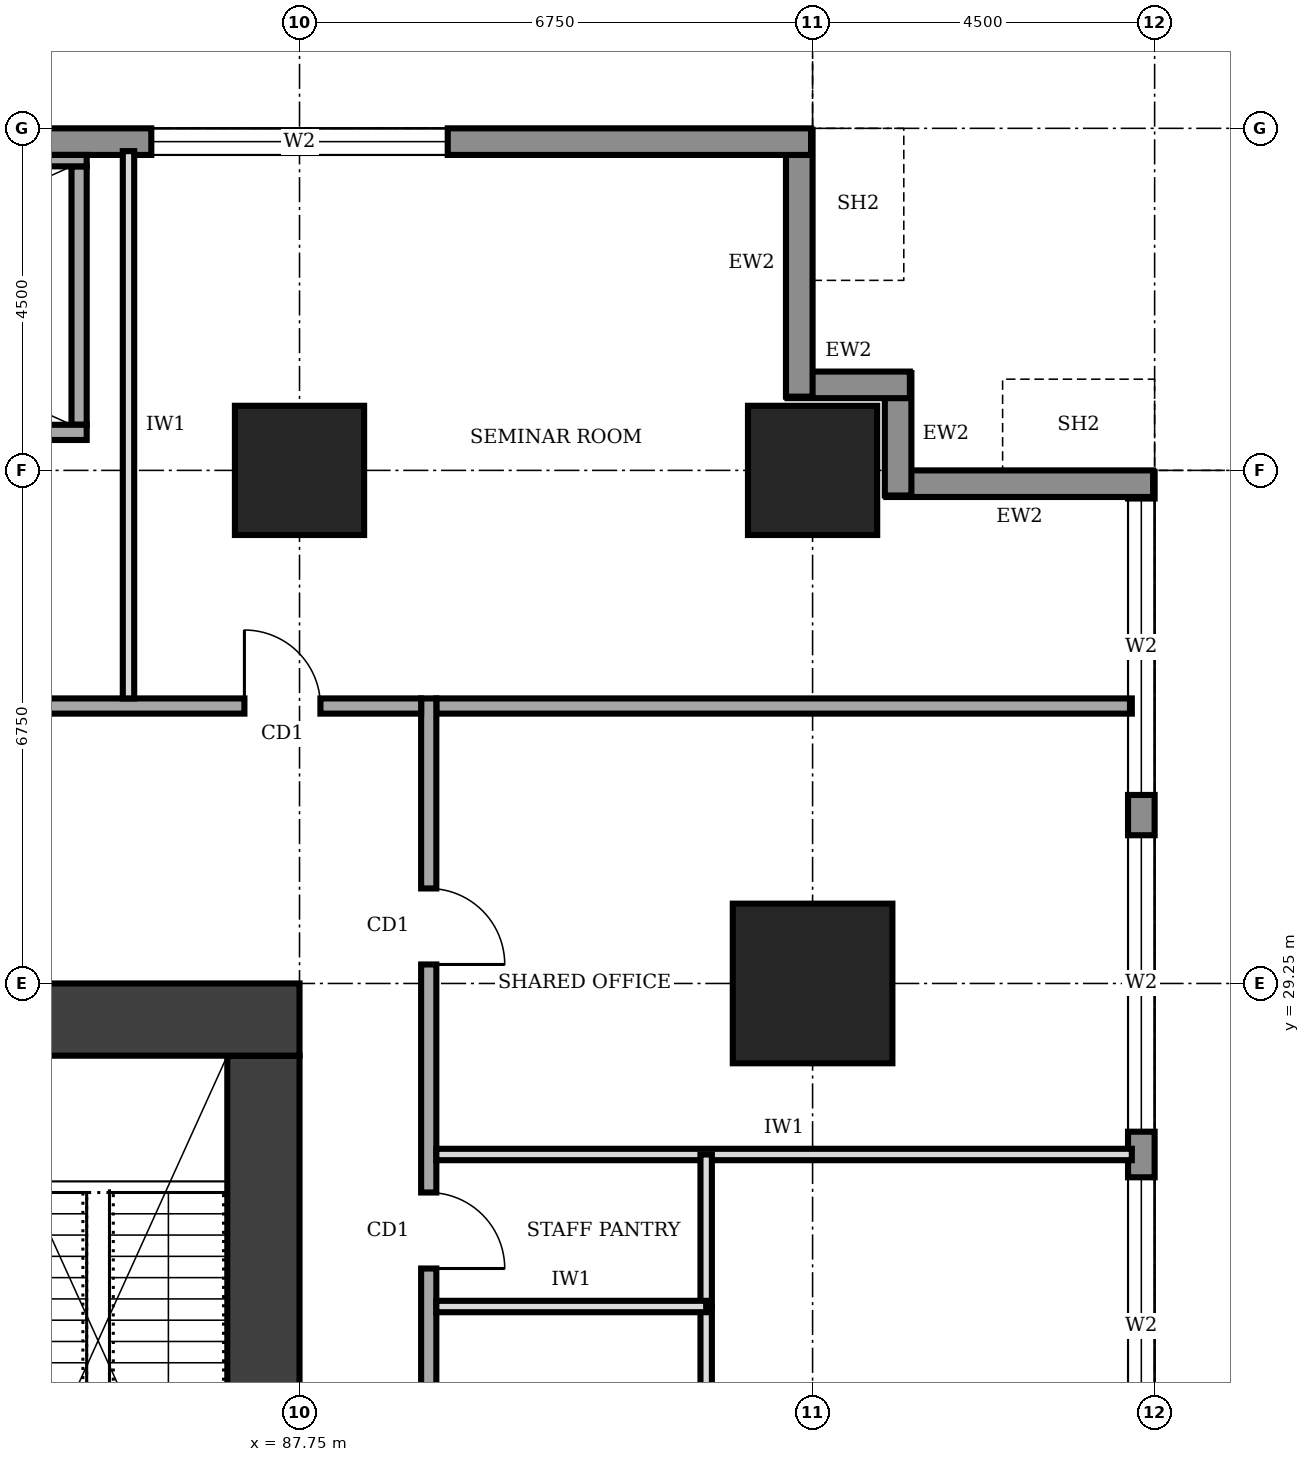
"""IFC4 building model, lengths in metres.
Left out: names, types, materials, properties, quantities, classifications, styles, units other than length and angle.
Written with IfcOpenShell. Run it as: python <this file> out.ifc"""

import sys

from ifc_helpers import new_model, si_unit, direction, frame, frame_2d, origin, origin_2d, place, context, subcontext, project, spatial, rectangle, extrude, element, fill, save


model = new_model("IFC4")
c1 = context("Model", 3, precision=1e-05, world=origin(), true_north=direction((0.0, 1.0)))
c2 = subcontext(c1, "Body", "Model", "MODEL_VIEW")
j1 = project(units=[si_unit("LENGTHUNIT", "METRE"), si_unit("PLANEANGLEUNIT", "RADIAN")], contexts=[c1])
p1 = place(None, origin())
s1 = spatial("IfcSite", under=j1, at=p1, CompositionType="ELEMENT")
p2 = place(p1, origin())
s2 = spatial("IfcBuilding", under=s1, at=p2, CompositionType="ELEMENT")
p3 = place(p2, frame((0.0, 0.0, 61.0)))
s3 = spatial("IfcBuildingStorey", under=s2, at=p3, CompositionType="ELEMENT", Elevation=61.0)
p4 = place(p3, frame((87.275, 12.2, 0.0), z_axis=(0.0, 0.0, 1.0), x_axis=(0.0, 1.0, 0.0)))
e1 = element("IfcWall", 1, at=p4, inside=s3, PredefinedType="SHEAR", context=c2, shape_type="SweptSolid", body=[
    extrude(rectangle(XDim=16.1, YDim=0.95, at=frame_2d((8.05, 0.0))), origin(), (0.0, 0.0, 1.0), 4.0),
])
p5 = place(p3, frame((87.75, 28.775, 0.0), z_axis=(0.0, 0.0, 1.0), x_axis=(-1.0, 0.0, 0.0)))
e2 = element("IfcWall", 2, at=p5, inside=s3, PredefinedType="SHEAR", context=c2, shape_type="SweptSolid", body=[
    extrude(rectangle(XDim=13.5, YDim=0.95, at=frame_2d((6.75, 0.0))), origin(), (0.0, 0.0, 1.0), 4.0),
])
p6 = place(p5, frame((4.75, 0.0, 0.0)))
e3 = element("IfcOpeningElement", 3, at=p6, cuts=e2, PredefinedType="OPENING", context=c2, shape_type="SweptSolid", body=[
    extrude(rectangle(XDim=1.8, YDim=2.1, at=frame_2d((0.9, 1.05))), frame((0.0, 0.485, 0.0), z_axis=(0.0, -1.0, 0.0), x_axis=(1.0, 0.0, 0.0)), (0.0, 0.0, 1.0), 0.97),
])
p7 = place(p3, frame((94.5, 29.25, 0.0), z_axis=(0.0, 0.0, 1.0), x_axis=(1.0, 0.0, 0.0)))
e4 = element("IfcColumn", 4, at=p7, inside=s3, PredefinedType="COLUMN", context=c2, shape_type="SweptSolid", body=[
    extrude(rectangle(XDim=2.1, YDim=2.1, at=origin_2d()), origin(), (0.0, 0.0, 1.0), 4.0),
])
for number, where, z_axis, x_axis in (
    (5, (87.75, 36.0, 0.0), (0.0, 0.0, 1.0), (1.0, 0.0, 0.0)),
    (6, (94.5, 36.0, 0.0), (0.0, 0.0, 1.0), (1.0, 0.0, 0.0)),
):
    element("IfcColumn", number, at=place(p3, frame(where, z_axis=z_axis, x_axis=x_axis)), inside=s3, PredefinedType="COLUMN", context=c2, shape_type="SweptSolid", body=[
        extrude(rectangle(XDim=1.7, YDim=1.7, at=origin_2d()), origin(), (0.0, 0.0, 1.0), 4.0),
    ])
p8 = place(p3, frame((98.825, 4.52, 0.0), z_axis=(0.0, 0.0, 1.0), x_axis=(0.0, 1.0, 0.0)))
e7 = element("IfcWall", 7, at=p8, inside=s3, PredefinedType="STANDARD", context=c2, shape_type="SweptSolid", body=[
    extrude(rectangle(XDim=31.46, YDim=0.35, at=frame_2d((15.73, 0.0))), origin(), (0.0, 0.0, 1.0), 3.75),
])
p9 = place(p8, frame((4.78, 0.0, 0.6)))
e8 = element("IfcOpeningElement", 8, at=p9, cuts=e7, PredefinedType="OPENING", context=c2, shape_type="SweptSolid", body=[
    extrude(rectangle(XDim=3.9, YDim=2.6, at=frame_2d((1.95, 1.3))), frame((0.0, 0.185, 0.0), z_axis=(0.0, -1.0, 0.0), x_axis=(1.0, 0.0, 0.0)), (0.0, 0.0, 1.0), 0.37),
])
p10 = place(p8, frame((9.28, 0.0, 0.6)))
e9 = element("IfcOpeningElement", 9, at=p10, cuts=e7, PredefinedType="OPENING", context=c2, shape_type="SweptSolid", body=[
    extrude(rectangle(XDim=3.9, YDim=2.6, at=frame_2d((1.95, 1.3))), frame((0.0, 0.185, 0.0), z_axis=(0.0, -1.0, 0.0), x_axis=(1.0, 0.0, 0.0)), (0.0, 0.0, 1.0), 0.37),
])
p11 = place(p8, frame((13.78, 0.0, 0.6)))
e10 = element("IfcOpeningElement", 10, at=p11, cuts=e7, PredefinedType="OPENING", context=c2, shape_type="SweptSolid", body=[
    extrude(rectangle(XDim=3.9, YDim=2.6, at=frame_2d((1.95, 1.3))), frame((0.0, 0.185, 0.0), z_axis=(0.0, -1.0, 0.0), x_axis=(1.0, 0.0, 0.0)), (0.0, 0.0, 1.0), 0.37),
])
p12 = place(p8, frame((18.28, 0.0, 0.6)))
e11 = element("IfcOpeningElement", 11, at=p12, cuts=e7, PredefinedType="OPENING", context=c2, shape_type="SweptSolid", body=[
    extrude(rectangle(XDim=3.9, YDim=2.6, at=frame_2d((1.95, 1.3))), frame((0.0, 0.185, 0.0), z_axis=(0.0, -1.0, 0.0), x_axis=(1.0, 0.0, 0.0)), (0.0, 0.0, 1.0), 0.37),
])
p13 = place(p8, frame((22.78, 0.0, 0.6)))
e12 = element("IfcOpeningElement", 12, at=p13, cuts=e7, PredefinedType="OPENING", context=c2, shape_type="SweptSolid", body=[
    extrude(rectangle(XDim=3.9, YDim=2.6, at=frame_2d((1.95, 1.3))), frame((0.0, 0.185, 0.0), z_axis=(0.0, -1.0, 0.0), x_axis=(1.0, 0.0, 0.0)), (0.0, 0.0, 1.0), 0.37),
])
p14 = place(p8, frame((27.21, 0.0, 0.6)))
e13 = element("IfcOpeningElement", 13, at=p14, cuts=e7, PredefinedType="OPENING", context=c2, shape_type="SweptSolid", body=[
    extrude(rectangle(XDim=3.9, YDim=2.6, at=frame_2d((1.95, 1.3))), frame((0.0, 0.185, 0.0), z_axis=(0.0, -1.0, 0.0), x_axis=(1.0, 0.0, 0.0)), (0.0, 0.0, 1.0), 0.37),
])
p15 = place(p3, frame((98.98, 35.825, 0.0), z_axis=(0.0, 0.0, 1.0), x_axis=(-1.0, 0.0, 0.0)))
e14 = element("IfcWall", 14, at=p15, inside=s3, PredefinedType="STANDARD", context=c2, shape_type="SweptSolid", body=[
    extrude(rectangle(XDim=3.51, YDim=0.35, at=frame_2d((1.755, 0.0))), origin(), (0.0, 0.0, 1.0), 2.85),
])
for number, where, z_axis, x_axis in (
    (15, (95.625, 35.67, 0.0), (0.0, 0.0, 1.0), (0.0, 1.0, 0.0)),
    (16, (95.78, 37.125, 0.0), (0.0, 0.0, 1.0), (-1.0, 0.0, 0.0)),
):
    element("IfcWall", number, at=place(p3, frame(where, z_axis=z_axis, x_axis=x_axis)), inside=s3, PredefinedType="STANDARD", context=c2, shape_type="SweptSolid", body=[
        extrude(rectangle(XDim=1.61, YDim=0.35, at=frame_2d((0.805, 0.0))), origin(), (0.0, 0.0, 1.0), 3.75),
    ])
p16 = place(p3, frame((94.325, 36.97, 0.0), z_axis=(0.0, 0.0, 1.0), x_axis=(0.0, 1.0, 0.0)))
e17 = element("IfcWall", 17, at=p16, inside=s3, PredefinedType="STANDARD", context=c2, shape_type="SweptSolid", body=[
    extrude(rectangle(XDim=3.51, YDim=0.35, at=frame_2d((1.755, 0.0))), origin(), (0.0, 0.0, 1.0), 2.85),
])
p17 = place(p3, frame((94.48, 40.325, 0.0), z_axis=(0.0, 0.0, 1.0), x_axis=(-1.0, 0.0, 0.0)))
e18 = element("IfcWall", 18, at=p17, inside=s3, PredefinedType="STANDARD", context=c2, shape_type="SweptSolid", body=[
    extrude(rectangle(XDim=26.96, YDim=0.35, at=frame_2d((13.48, 0.0))), origin(), (0.0, 0.0, 1.0), 3.75),
])
p18 = place(p17, frame((22.71, 0.0, 0.6)))
e19 = element("IfcOpeningElement", 19, at=p18, cuts=e18, PredefinedType="OPENING", context=c2, shape_type="SweptSolid", body=[
    extrude(rectangle(XDim=3.9, YDim=2.6, at=frame_2d((1.95, 1.3))), frame((0.0, 0.185, 0.0), z_axis=(0.0, -1.0, 0.0), x_axis=(1.0, 0.0, 0.0)), (0.0, 0.0, 1.0), 0.37),
])
p19 = place(p17, frame((18.28, 0.0, 0.6)))
e20 = element("IfcOpeningElement", 20, at=p19, cuts=e18, PredefinedType="OPENING", context=c2, shape_type="SweptSolid", body=[
    extrude(rectangle(XDim=3.9, YDim=2.6, at=frame_2d((1.95, 1.3))), frame((0.0, 0.185, 0.0), z_axis=(0.0, -1.0, 0.0), x_axis=(1.0, 0.0, 0.0)), (0.0, 0.0, 1.0), 0.37),
])
p20 = place(p17, frame((4.78, 0.0, 0.6)))
e21 = element("IfcOpeningElement", 21, at=p20, cuts=e18, PredefinedType="OPENING", context=c2, shape_type="SweptSolid", body=[
    extrude(rectangle(XDim=3.9, YDim=2.6, at=frame_2d((1.95, 1.3))), frame((0.0, 0.185, 0.0), z_axis=(0.0, -1.0, 0.0), x_axis=(1.0, 0.0, 0.0)), (0.0, 0.0, 1.0), 0.37),
])
p21 = place(p3, frame((89.45, 7.7, 0.0), z_axis=(0.0, 0.0, 1.0), x_axis=(0.0, 1.0, 0.0)))
e22 = element("IfcWall", 22, at=p21, inside=s3, PredefinedType="SOLIDWALL", context=c2, shape_type="SweptSolid", body=[
    extrude(rectangle(XDim=25.3, YDim=0.2, at=frame_2d((12.65, 0.0))), origin(), (0.0, 0.0, 1.0), 3.75),
])
p22 = place(p21, frame((2.3, 0.0, 0.0)))
e23 = element("IfcOpeningElement", 23, at=p22, cuts=e22, PredefinedType="OPENING", context=c2, shape_type="SweptSolid", body=[
    extrude(rectangle(XDim=1.0, YDim=2.1, at=frame_2d((0.5, 1.05))), frame((0.0, 0.11, 0.0), z_axis=(0.0, -1.0, 0.0), x_axis=(1.0, 0.0, 0.0)), (0.0, 0.0, 1.0), 0.22),
])
p23 = place(p21, frame((7.25, 0.0, 0.0)))
e24 = element("IfcOpeningElement", 24, at=p23, cuts=e22, PredefinedType="OPENING", context=c2, shape_type="SweptSolid", body=[
    extrude(rectangle(XDim=0.9, YDim=2.1, at=frame_2d((0.45, 1.05))), frame((0.0, 0.11, 0.0), z_axis=(0.0, -1.0, 0.0), x_axis=(1.0, 0.0, 0.0)), (0.0, 0.0, 1.0), 0.22),
])
p24 = place(p21, frame((10.25, 0.0, 0.0)))
e25 = element("IfcOpeningElement", 25, at=p24, cuts=e22, PredefinedType="OPENING", context=c2, shape_type="SweptSolid", body=[
    extrude(rectangle(XDim=0.9, YDim=2.1, at=frame_2d((0.45, 1.05))), frame((0.0, 0.11, 0.0), z_axis=(0.0, -1.0, 0.0), x_axis=(1.0, 0.0, 0.0)), (0.0, 0.0, 1.0), 0.22),
])
p25 = place(p21, frame((15.1, 0.0, 0.0)))
e26 = element("IfcOpeningElement", 26, at=p25, cuts=e22, PredefinedType="OPENING", context=c2, shape_type="SweptSolid", body=[
    extrude(rectangle(XDim=0.9, YDim=2.1, at=frame_2d((0.45, 1.05))), frame((0.0, 0.11, 0.0), z_axis=(0.0, -1.0, 0.0), x_axis=(1.0, 0.0, 0.0)), (0.0, 0.0, 1.0), 0.22),
])
p26 = place(p21, frame((17.8, 0.0, 0.0)))
e27 = element("IfcOpeningElement", 27, at=p26, cuts=e22, PredefinedType="OPENING", context=c2, shape_type="SweptSolid", body=[
    extrude(rectangle(XDim=1.0, YDim=2.1, at=frame_2d((0.5, 1.05))), frame((0.0, 0.11, 0.0), z_axis=(0.0, -1.0, 0.0), x_axis=(1.0, 0.0, 0.0)), (0.0, 0.0, 1.0), 0.22),
])
p27 = place(p21, frame((12.3, 0.0, 0.0)))
e28 = element("IfcOpeningElement", 28, at=p27, cuts=e22, PredefinedType="OPENING", context=c2, shape_type="SweptSolid", body=[
    extrude(rectangle(XDim=1.0, YDim=2.1, at=frame_2d((0.5, 1.05))), frame((0.0, 0.11, 0.0), z_axis=(0.0, -1.0, 0.0), x_axis=(1.0, 0.0, 0.0)), (0.0, 0.0, 1.0), 0.22),
])
p28 = place(p21, frame((21.8, 0.0, 0.0)))
e29 = element("IfcOpeningElement", 29, at=p28, cuts=e22, PredefinedType="OPENING", context=c2, shape_type="SweptSolid", body=[
    extrude(rectangle(XDim=1.0, YDim=2.1, at=frame_2d((0.5, 1.05))), frame((0.0, 0.11, 0.0), z_axis=(0.0, -1.0, 0.0), x_axis=(1.0, 0.0, 0.0)), (0.0, 0.0, 1.0), 0.22),
])
p29 = place(p3, frame((89.35, 32.9, 0.0), z_axis=(0.0, 0.0, 1.0), x_axis=(-1.0, 0.0, 0.0)))
e30 = element("IfcWall", 30, at=p29, inside=s3, PredefinedType="SOLIDWALL", context=c2, shape_type="SweptSolid", body=[
    extrude(rectangle(XDim=16.9, YDim=0.2, at=frame_2d((8.45, 0.0))), origin(), (0.0, 0.0, 1.0), 3.75),
])
p30 = place(p29, frame((14.375, 0.0, 0.0)))
e31 = element("IfcOpeningElement", 31, at=p30, cuts=e30, PredefinedType="OPENING", context=c2, shape_type="SweptSolid", body=[
    extrude(rectangle(XDim=1.0, YDim=2.1, at=frame_2d((0.5, 1.05))), frame((0.0, 0.11, 0.0), z_axis=(0.0, -1.0, 0.0), x_axis=(1.0, 0.0, 0.0)), (0.0, 0.0, 1.0), 0.22),
])
p31 = place(p29, frame((7.85, 0.0, 0.0)))
e32 = element("IfcOpeningElement", 32, at=p31, cuts=e30, PredefinedType="OPENING", context=c2, shape_type="SweptSolid", body=[
    extrude(rectangle(XDim=1.0, YDim=2.1, at=frame_2d((0.5, 1.05))), frame((0.0, 0.11, 0.0), z_axis=(0.0, -1.0, 0.0), x_axis=(1.0, 0.0, 0.0)), (0.0, 0.0, 1.0), 0.22),
])
p32 = place(p29, frame((1.325, 0.0, 0.0)))
e33 = element("IfcOpeningElement", 33, at=p32, cuts=e30, PredefinedType="OPENING", context=c2, shape_type="SweptSolid", body=[
    extrude(rectangle(XDim=1.0, YDim=2.1, at=frame_2d((0.5, 1.05))), frame((0.0, 0.11, 0.0), z_axis=(0.0, -1.0, 0.0), x_axis=(1.0, 0.0, 0.0)), (0.0, 0.0, 1.0), 0.22),
])
p33 = place(p3, frame((89.55, 32.9, 0.0), z_axis=(0.0, 0.0, 1.0), x_axis=(1.0, 0.0, 0.0)))
e34 = element("IfcWall", 34, at=p33, inside=s3, PredefinedType="SOLIDWALL", context=c2, shape_type="SweptSolid", body=[
    extrude(rectangle(XDim=9.15, YDim=0.2, at=frame_2d((4.575, 0.0))), origin(), (0.0, 0.0, 1.0), 3.75),
])
p34 = place(p3, frame((85.5, 33.0, 0.0), z_axis=(0.0, 0.0, 1.0), x_axis=(0.0, 1.0, 0.0)))
e35 = element("IfcWall", 35, at=p34, inside=s3, PredefinedType="PARTITIONING", context=c2, shape_type="SweptSolid", body=[
    extrude(rectangle(XDim=7.2, YDim=0.15, at=frame_2d((3.6, 0.0))), origin(), (0.0, 0.0, 1.0), 3.75),
])
p35 = place(p3, frame((89.55, 27.0, 0.0), z_axis=(0.0, 0.0, 1.0), x_axis=(1.0, 0.0, 0.0)))
e36 = element("IfcWall", 36, at=p35, inside=s3, PredefinedType="PARTITIONING", context=c2, shape_type="SweptSolid", body=[
    extrude(rectangle(XDim=9.15, YDim=0.15, at=frame_2d((4.575, 0.0))), origin(), (0.0, 0.0, 1.0), 3.75),
])
p36 = place(p3, frame((89.55, 25.0, 0.0), z_axis=(0.0, 0.0, 1.0), x_axis=(1.0, 0.0, 0.0)))
e37 = element("IfcWall", 37, at=p36, inside=s3, PredefinedType="PARTITIONING", context=c2, shape_type="SweptSolid", body=[
    extrude(rectangle(XDim=3.55, YDim=0.15, at=frame_2d((1.775, 0.0))), origin(), (0.0, 0.0, 1.0), 3.75),
])
p37 = place(p3, frame((93.1, 21.5, 0.0), z_axis=(0.0, 0.0, 1.0), x_axis=(0.0, 1.0, 0.0)))
e38 = element("IfcWall", 38, at=p37, inside=s3, PredefinedType="PARTITIONING", context=c2, shape_type="SweptSolid", body=[
    extrude(rectangle(XDim=3.5, YDim=0.15, at=frame_2d((1.75, 0.0))), origin(), (0.0, 0.0, 1.0), 3.75),
])
p38 = place(p3, frame((93.1, 25.0, 0.0), z_axis=(0.0, 0.0, 1.0), x_axis=(0.0, 1.0, 0.0)))
e39 = element("IfcWall", 39, at=p38, inside=s3, PredefinedType="PARTITIONING", context=c2, shape_type="SweptSolid", body=[
    extrude(rectangle(XDim=2.0, YDim=0.15, at=frame_2d((1.0, 0.0))), origin(), (0.0, 0.0, 1.0), 3.75),
])
p39 = place(p3, frame((77.05, 36.5, 0.0), z_axis=(0.0, 0.0, 1.0), x_axis=(1.0, 0.0, 0.0)))
e40 = element("IfcWall", 40, at=p39, inside=s3, PredefinedType="SOLIDWALL", context=c2, shape_type="SweptSolid", body=[
    extrude(rectangle(XDim=7.9, YDim=0.2, at=frame_2d((3.95, 0.0))), origin(), (0.0, 0.0, 1.0), 3.75),
])
p40 = place(p39, frame((6.3, 0.0, 0.0)))
e41 = element("IfcOpeningElement", 41, at=p40, cuts=e40, PredefinedType="OPENING", context=c2, shape_type="SweptSolid", body=[
    extrude(rectangle(XDim=1.0, YDim=2.1, at=frame_2d((0.5, 1.05))), frame((0.0, 0.11, 0.0), z_axis=(0.0, -1.0, 0.0), x_axis=(1.0, 0.0, 0.0)), (0.0, 0.0, 1.0), 0.22),
])
p41 = place(p3, frame((77.05, 40.075, 0.0), z_axis=(0.0, 0.0, 1.0), x_axis=(1.0, 0.0, 0.0)))
e42 = element("IfcWall", 42, at=p41, inside=s3, PredefinedType="SOLIDWALL", context=c2, shape_type="SweptSolid", body=[
    extrude(rectangle(XDim=7.9, YDim=0.15, at=frame_2d((3.95, 0.0))), origin(), (0.0, 0.0, 1.0), 3.75),
])
p42 = place(p3, frame((84.85, 36.6, 0.0), z_axis=(0.0, 0.0, 1.0), x_axis=(0.0, 1.0, 0.0)))
e43 = element("IfcWall", 43, at=p42, inside=s3, PredefinedType="SOLIDWALL", context=c2, shape_type="SweptSolid", body=[
    extrude(rectangle(XDim=3.4, YDim=0.2, at=frame_2d((1.7, 0.0))), origin(), (0.0, 0.0, 1.0), 3.75),
])
p43 = place(p12, origin())
e44 = element("IfcWindow", 44, at=p43, inside=s3, PartitioningType="SINGLE_PANEL", PredefinedType="WINDOW", context=c2, shape_type="SweptSolid", body=[
    extrude(rectangle(XDim=3.9, YDim=2.6, at=frame_2d((1.95, 1.3))), frame((0.0, 0.03, 0.0), z_axis=(0.0, -1.0, 0.0), x_axis=(1.0, 0.0, 0.0)), (0.0, 0.0, 1.0), 0.06),
])
fill(e11, e44)
p44 = place(p13, origin())
e45 = element("IfcWindow", 45, at=p44, inside=s3, PartitioningType="SINGLE_PANEL", PredefinedType="WINDOW", context=c2, shape_type="SweptSolid", body=[
    extrude(rectangle(XDim=3.9, YDim=2.6, at=frame_2d((1.95, 1.3))), frame((0.0, 0.03, 0.0), z_axis=(0.0, -1.0, 0.0), x_axis=(1.0, 0.0, 0.0)), (0.0, 0.0, 1.0), 0.06),
])
fill(e12, e45)
p45 = place(p14, origin())
e46 = element("IfcWindow", 46, at=p45, inside=s3, PartitioningType="SINGLE_PANEL", PredefinedType="WINDOW", context=c2, shape_type="SweptSolid", body=[
    extrude(rectangle(XDim=3.9, YDim=2.6, at=frame_2d((1.95, 1.3))), frame((0.0, 0.03, 0.0), z_axis=(0.0, -1.0, 0.0), x_axis=(1.0, 0.0, 0.0)), (0.0, 0.0, 1.0), 0.06),
])
fill(e13, e46)
p46 = place(p20, origin())
e47 = element("IfcWindow", 47, at=p46, inside=s3, PartitioningType="SINGLE_PANEL", PredefinedType="WINDOW", context=c2, shape_type="SweptSolid", body=[
    extrude(rectangle(XDim=3.9, YDim=2.6, at=frame_2d((1.95, 1.3))), frame((0.0, 0.03, 0.0), z_axis=(0.0, -1.0, 0.0), x_axis=(1.0, 0.0, 0.0)), (0.0, 0.0, 1.0), 0.06),
])
fill(e21, e47)
p47 = place(p26, frame((1.0, 0.0, 0.0), z_axis=(0.0, 0.0, 1.0), x_axis=(-1.0, 0.0, 0.0)))
e48 = element("IfcDoor", 48, at=p47, inside=s3, OperationType="SINGLE_SWING_RIGHT", PredefinedType="DOOR", context=c2, shape_type="SweptSolid", body=[
    extrude(rectangle(XDim=1.0, YDim=2.1, at=frame_2d((0.5, 1.05))), frame((0.0, 0.025, 0.0), z_axis=(0.0, -1.0, 0.0), x_axis=(1.0, 0.0, 0.0)), (0.0, 0.0, 1.0), 0.05),
])
fill(e27, e48)
p48 = place(p28, frame((1.0, 0.0, 0.0), z_axis=(0.0, 0.0, 1.0), x_axis=(-1.0, 0.0, 0.0)))
e49 = element("IfcDoor", 49, at=p48, inside=s3, OperationType="SINGLE_SWING_RIGHT", PredefinedType="DOOR", context=c2, shape_type="SweptSolid", body=[
    extrude(rectangle(XDim=1.0, YDim=2.1, at=frame_2d((0.5, 1.05))), frame((0.0, 0.025, 0.0), z_axis=(0.0, -1.0, 0.0), x_axis=(1.0, 0.0, 0.0)), (0.0, 0.0, 1.0), 0.05),
])
fill(e29, e49)
p49 = place(p32, frame((1.0, 0.0, 0.0), z_axis=(0.0, 0.0, 1.0), x_axis=(-1.0, 0.0, 0.0)))
e50 = element("IfcDoor", 50, at=p49, inside=s3, OperationType="SINGLE_SWING_LEFT", PredefinedType="DOOR", context=c2, shape_type="SweptSolid", body=[
    extrude(rectangle(XDim=1.0, YDim=2.1, at=frame_2d((0.5, 1.05))), frame((0.0, 0.025, 0.0), z_axis=(0.0, -1.0, 0.0), x_axis=(1.0, 0.0, 0.0)), (0.0, 0.0, 1.0), 0.05),
])
fill(e33, e50)
save(model, sys.argv[1])
